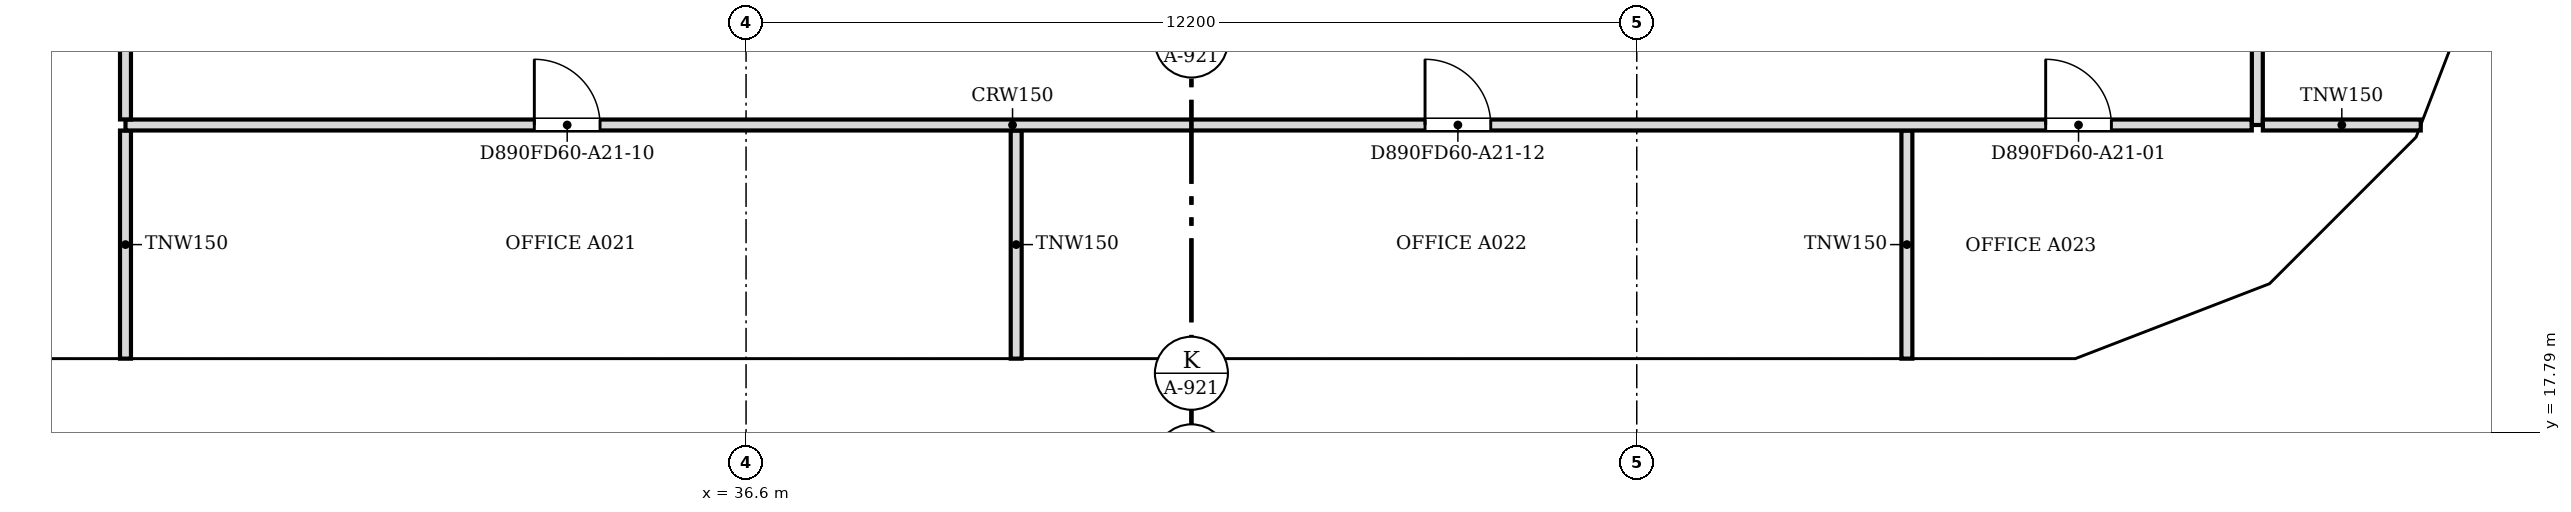
"""IFC4 building model, lengths in metres.
Left out: names, types, materials, properties, quantities, classifications, styles, units other than length and angle.
Written with IfcOpenShell. Run it as: python <this file> out.ifc"""

import sys

from ifc_helpers import new_model, si_unit, direction, frame, frame_2d, origin, place, context, subcontext, project, spatial, polyline, rectangle, outline, extrude, faceted_brep, source, transform, mapped, element, fill, save


model = new_model("IFC4")
c1 = context("Model", 3, precision=1e-05, world=origin(), true_north=direction((0.0, 1.0)))
c2 = subcontext(c1, "Body", "Model", "MODEL_VIEW")
j1 = project(units=[si_unit("LENGTHUNIT", "METRE"), si_unit("PLANEANGLEUNIT", "RADIAN")], contexts=[c1])
p1 = place(None, origin())
s1 = spatial("IfcSite", under=j1, at=p1, CompositionType="ELEMENT")
p2 = place(p1, origin())
s2 = spatial("IfcBuilding", under=s1, at=p2, CompositionType="ELEMENT")
p3 = place(p2, frame((0.0, 0.0, 240.7)))
s3 = spatial("IfcBuildingStorey", under=s2, at=p3, CompositionType="ELEMENT", Elevation=240.7)
m1 = source(origin(), c2, "Body", "SweptSolid", [
    extrude(outline(polyline([(3.05, 0.0), (6.1, 3.8), (3.05, 7.6), (0.0, 3.8), (3.05, 0.0)])), frame((0.0, 0.25, 0.0), z_axis=(0.0, -1.0, 0.0), x_axis=(1.0, 0.0, 0.0)), (0.0, 0.0, 1.0), 0.5),
])
p4 = place(p3, frame((24.4, 18.55, -3.8), z_axis=(0.0, 0.0, 1.0), x_axis=(1.0, 0.0, 0.0)))
e1 = element("IfcWall", 1, at=p4, inside=s3, PredefinedType="SOLIDWALL", context=c2, shape_type="MappedRepresentation", body=[
    mapped(m1, transform((0.0, 0.0, 0.0), scale=1.0)),
])
m2 = source(origin(), c2, "Body", "SweptSolid", [
    extrude(outline(polyline([(3.05, 0.399), (5.78, 3.8), (3.05, 7.201), (0.321, 3.8), (3.05, 0.399)])), frame((0.0, 0.26, 0.0), z_axis=(0.0, -1.0, 0.0), x_axis=(1.0, 0.0, 0.0)), (0.0, 0.0, 1.0), 0.52),
])
p5 = place(p4, origin())
e2 = element("IfcOpeningElement", 2, at=p5, cuts=e1, PredefinedType="OPENING", context=c2, shape_type="MappedRepresentation", body=[
    mapped(m2, transform((0.0, 0.0, 0.0), scale=1.0)),
])
p6 = place(p3, frame((30.5, 18.55, -3.8), z_axis=(0.0, 0.0, 1.0), x_axis=(1.0, 0.0, 0.0)))
e3 = element("IfcWall", 3, at=p6, inside=s3, PredefinedType="SOLIDWALL", context=c2, shape_type="MappedRepresentation", body=[
    mapped(m1, transform((0.0, 0.0, 0.0), scale=1.0)),
])
p7 = place(p6, origin())
e4 = element("IfcOpeningElement", 4, at=p7, cuts=e3, PredefinedType="OPENING", context=c2, shape_type="MappedRepresentation", body=[
    mapped(m2, transform((0.0, 0.0, 0.0), scale=1.0)),
])
m3 = source(origin(), c2, "Body", "Brep", [
    faceted_brep([(3.05, -0.25, 0.0), (6.1, -0.25, 3.8), (6.1, -0.25, 3.8), (3.05, -0.25, 7.6), (0.0, -0.25, 3.8), (0.0, 0.25, 3.8), (3.05, 0.25, 7.6), (6.1, 0.25, 3.8), (6.1, 0.25, 3.8), (3.05, 0.25, 0.0)], [[[0, 1, 2, 3, 4]], [[5, 6, 7, 8, 9]], [[9, 8, 1, 0]], [[7, 6, 3, 2]], [[6, 5, 4, 3]], [[5, 9, 0, 4]], [[1, 8, 7, 2]]]),
])
p8 = place(p3, frame((36.6, 18.55, -3.8), z_axis=(0.0, 0.0, 1.0), x_axis=(1.0, 0.0, 0.0)))
e5 = element("IfcWall", 5, at=p8, inside=s3, PredefinedType="SOLIDWALL", context=c2, shape_type="MappedRepresentation", body=[
    mapped(m3, transform((0.0, 0.0, 0.0), scale=1.0)),
])
p9 = place(p8, origin())
e6 = element("IfcOpeningElement", 6, at=p9, cuts=e5, PredefinedType="OPENING", context=c2, shape_type="MappedRepresentation", body=[
    mapped(m2, transform((0.0, 0.0, 0.0), scale=1.0)),
])
p10 = place(p3, frame((42.7, 18.55, -3.8), z_axis=(0.0, 0.0, 1.0), x_axis=(1.0, 0.0, 0.0)))
e7 = element("IfcWall", 7, at=p10, inside=s3, PredefinedType="SOLIDWALL", context=c2, shape_type="MappedRepresentation", body=[
    mapped(m1, transform((0.0, 0.0, 0.0), scale=1.0)),
])
p11 = place(p10, origin())
e8 = element("IfcOpeningElement", 8, at=p11, cuts=e7, PredefinedType="OPENING", context=c2, shape_type="MappedRepresentation", body=[
    mapped(m2, transform((0.0, 0.0, 0.0), scale=1.0)),
])
m4 = source(origin(), c2, "Body", "Brep", [
    faceted_brep([(3.05, -0.25, 0.0), (6.053, -0.25, 3.8), (3.05, -0.25, 7.6), (0.0, -0.25, 3.8), (0.0, 0.25, 3.8), (3.05, 0.25, 7.6), (6.007, 0.25, 3.859), (6.007, 0.25, 3.741), (3.05, 0.25, 0.0), (6.053, 0.0, 3.8)], [[[0, 1, 2, 3]], [[4, 5, 6, 7, 8]], [[8, 7, 9, 1, 0]], [[6, 5, 2, 1, 9]], [[5, 4, 3, 2]], [[4, 8, 0, 3]], [[9, 7, 6]]]),
])
p12 = place(p3, frame((48.8, 18.55, -3.8), z_axis=(0.0, 0.0, 1.0), x_axis=(1.0, 0.0, 0.0)))
e9 = element("IfcWall", 9, at=p12, inside=s3, PredefinedType="SOLIDWALL", context=c2, shape_type="MappedRepresentation", body=[
    mapped(m4, transform((0.0, 0.0, 0.0), scale=1.0)),
])
m5 = source(origin(), c2, "Body", "SweptSolid", [
    extrude(outline(polyline([(3.049, 0.401), (5.735, 3.8), (3.049, 7.199), (0.321, 3.8), (3.049, 0.401)])), frame((0.0, 0.26, 0.0), z_axis=(0.0, -1.0, 0.0), x_axis=(1.0, 0.0, 0.0)), (0.0, 0.0, 1.0), 0.52),
])
p13 = place(p12, origin())
e10 = element("IfcOpeningElement", 10, at=p13, cuts=e9, PredefinedType="OPENING", context=c2, shape_type="MappedRepresentation", body=[
    mapped(m5, transform((0.0, 0.0, 0.0), scale=1.0)),
])
m6 = source(origin(), c2, "Body", "Brep", [
    faceted_brep([(2.95, -0.25, 0.0), (3.003, -0.25, 0.068), (3.003, -0.25, 7.532), (2.95, -0.25, 7.6), (0.0, -0.25, 3.8), (0.047, 0.25, 3.86), (2.898, 0.25, 7.532), (2.898, 0.25, 0.068), (0.047, 0.25, 3.74), (2.95, 0.0, 0.0), (2.95, 0.0, 7.6), (0.0, 0.0, 3.8)], [[[0, 1, 2, 3, 4]], [[5, 6, 7, 8]], [[1, 0, 9]], [[10, 3, 2]], [[6, 5, 11, 4, 3, 10]], [[8, 7, 9, 0, 4, 11]], [[8, 11, 5]], [[1, 9, 7, 6, 10, 2]]]),
])
p14 = place(p3, frame((54.854, 18.55, -3.8), z_axis=(0.0, 0.0, 1.0), x_axis=(0.932997369089, 0.359883188373, 0.0)))
e11 = element("IfcWall", 11, at=p14, inside=s3, PredefinedType="SOLIDWALL", context=c2, shape_type="MappedRepresentation", body=[
    mapped(m6, transform((0.0, 0.0, 0.0), scale=1.0)),
])
m7 = source(origin(), c2, "Body", "SweptSolid", [
    extrude(outline(polyline([(2.75, 6.935), (0.316, 3.8), (2.75, 0.665), (2.75, 6.935)])), frame((0.0, 0.26, 0.0), z_axis=(0.0, -1.0, 0.0), x_axis=(1.0, 0.0, 0.0)), (0.0, 0.0, 1.0), 0.52),
])
p15 = place(p14, origin())
e12 = element("IfcOpeningElement", 12, at=p15, cuts=e11, PredefinedType="OPENING", context=c2, shape_type="MappedRepresentation", body=[
    mapped(m7, transform((0.0, 0.0, 0.0), scale=1.0)),
])
m8 = source(origin(), c2, "Body", "Brep", [
    faceted_brep([(0.053, -0.25, 0.0), (2.997, -0.25, 3.8), (0.053, -0.25, 7.6), (0.0, -0.25, 7.532), (0.0, -0.25, 0.068), (0.106, 0.25, 7.532), (2.944, 0.25, 3.868), (2.944, 0.25, 3.732), (0.106, 0.25, 0.068), (2.997, 0.0, 3.8), (0.053, 0.0, 0.0), (0.053, 0.0, 7.6)], [[[0, 1, 2, 3, 4]], [[5, 6, 7, 8]], [[8, 7, 9, 1, 0, 10]], [[6, 5, 11, 2, 1, 9]], [[3, 2, 11]], [[10, 0, 4]], [[8, 10, 4, 3, 11, 5]], [[9, 7, 6]]]),
])
p16 = place(p3, frame((57.569, 19.574, -3.8), z_axis=(0.0, 0.0, 1.0), x_axis=(0.707106781187, 0.707106781187, 0.0)))
e13 = element("IfcWall", 13, at=p16, inside=s3, PredefinedType="SOLIDWALL", context=c2, shape_type="MappedRepresentation", body=[
    mapped(m8, transform((0.0, 0.0, 0.0), scale=1.0)),
])
m9 = source(origin(), c2, "Body", "SweptSolid", [
    extrude(outline(polyline([(0.253, 0.667), (2.681, 3.8), (0.253, 6.934), (0.253, 0.667)])), frame((0.0, 0.26, 0.0), z_axis=(0.0, -1.0, 0.0), x_axis=(1.0, 0.0, 0.0)), (0.0, 0.0, 1.0), 0.52),
])
p17 = place(p16, origin())
e14 = element("IfcOpeningElement", 14, at=p17, cuts=e13, PredefinedType="OPENING", context=c2, shape_type="MappedRepresentation", body=[
    mapped(m9, transform((0.0, 0.0, 0.0), scale=1.0)),
])
m10 = source(origin(), c2, "Body", "Brep", [
    faceted_brep([(2.95, -0.25, 0.0), (2.997, -0.25, 0.059), (2.997, -0.25, 7.541), (2.95, -0.25, 7.6), (0.0, -0.25, 3.8), (0.053, 0.25, 3.868), (2.904, 0.25, 7.54), (2.904, 0.25, 0.06), (0.053, 0.25, 3.732), (2.95, 0.0, 0.0), (2.95, 0.0, 7.6), (0.0, 0.0, 3.8)], [[[0, 1, 2, 3, 4]], [[5, 6, 7, 8]], [[1, 0, 9]], [[10, 3, 2]], [[6, 5, 11, 4, 3, 10]], [[8, 7, 9, 0, 4, 11]], [[8, 11, 5]], [[1, 9, 7, 6, 10, 2]]]),
])
p18 = place(p3, frame((59.688, 21.694, -3.8), z_axis=(0.0, 0.0, 1.0), x_axis=(0.359972353723, 0.932962970624, 0.0)))
e15 = element("IfcWall", 15, at=p18, inside=s3, PredefinedType="SOLIDWALL", context=c2, shape_type="MappedRepresentation", body=[
    mapped(m10, transform((0.0, 0.0, 0.0), scale=1.0)),
])
p19 = place(p18, origin())
e16 = element("IfcOpeningElement", 16, at=p19, cuts=e15, PredefinedType="OPENING", context=c2, shape_type="MappedRepresentation", body=[
    mapped(m7, transform((0.0, 0.0, 0.0), scale=1.0)),
])
p20 = place(p2, frame((0.0, 0.0, 244.5)))
s4 = spatial("IfcBuildingStorey", under=s2, at=p20, CompositionType="ELEMENT", Elevation=244.5)
p21 = place(p20, frame((21.35, 18.55, -3.8), z_axis=(0.0, 0.0, 1.0), x_axis=(1.0, 0.0, 0.0)))
e17 = element("IfcWall", 17, at=p21, inside=s4, PredefinedType="SOLIDWALL", context=c2, shape_type="MappedRepresentation", body=[
    mapped(m3, transform((0.0, 0.0, 0.0), scale=1.0)),
])
p22 = place(p21, origin())
e18 = element("IfcOpeningElement", 18, at=p22, cuts=e17, PredefinedType="OPENING", context=c2, shape_type="MappedRepresentation", body=[
    mapped(m2, transform((0.0, 0.0, 0.0), scale=1.0)),
])
p23 = place(p20, frame((27.45, 18.55, -3.8), z_axis=(0.0, 0.0, 1.0), x_axis=(1.0, 0.0, 0.0)))
e19 = element("IfcWall", 19, at=p23, inside=s4, PredefinedType="SOLIDWALL", context=c2, shape_type="MappedRepresentation", body=[
    mapped(m1, transform((0.0, 0.0, 0.0), scale=1.0)),
])
p24 = place(p23, origin())
e20 = element("IfcOpeningElement", 20, at=p24, cuts=e19, PredefinedType="OPENING", context=c2, shape_type="MappedRepresentation", body=[
    mapped(m2, transform((0.0, 0.0, 0.0), scale=1.0)),
])
p25 = place(p20, frame((33.55, 18.55, -3.8), z_axis=(0.0, 0.0, 1.0), x_axis=(1.0, 0.0, 0.0)))
e21 = element("IfcWall", 21, at=p25, inside=s4, PredefinedType="SOLIDWALL", context=c2, shape_type="MappedRepresentation", body=[
    mapped(m3, transform((0.0, 0.0, 0.0), scale=1.0)),
])
p26 = place(p25, origin())
e22 = element("IfcOpeningElement", 22, at=p26, cuts=e21, PredefinedType="OPENING", context=c2, shape_type="MappedRepresentation", body=[
    mapped(m2, transform((0.0, 0.0, 0.0), scale=1.0)),
])
p27 = place(p20, frame((39.65, 18.55, -3.8), z_axis=(0.0, 0.0, 1.0), x_axis=(1.0, 0.0, 0.0)))
e23 = element("IfcWall", 23, at=p27, inside=s4, PredefinedType="SOLIDWALL", context=c2, shape_type="MappedRepresentation", body=[
    mapped(m1, transform((0.0, 0.0, 0.0), scale=1.0)),
])
p28 = place(p27, origin())
e24 = element("IfcOpeningElement", 24, at=p28, cuts=e23, PredefinedType="OPENING", context=c2, shape_type="MappedRepresentation", body=[
    mapped(m2, transform((0.0, 0.0, 0.0), scale=1.0)),
])
p29 = place(p20, frame((45.75, 18.55, -3.8), z_axis=(0.0, 0.0, 1.0), x_axis=(1.0, 0.0, 0.0)))
e25 = element("IfcWall", 25, at=p29, inside=s4, PredefinedType="SOLIDWALL", context=c2, shape_type="MappedRepresentation", body=[
    mapped(m1, transform((0.0, 0.0, 0.0), scale=1.0)),
])
p30 = place(p29, origin())
e26 = element("IfcOpeningElement", 26, at=p30, cuts=e25, PredefinedType="OPENING", context=c2, shape_type="MappedRepresentation", body=[
    mapped(m2, transform((0.0, 0.0, 0.0), scale=1.0)),
])
m11 = source(origin(), c2, "Body", "Brep", [
    faceted_brep([(3.003, -0.25, 0.0), (3.05, -0.25, 0.06), (3.05, -0.25, 7.54), (3.003, -0.25, 7.6), (0.0, -0.25, 3.8), (0.0, 0.25, 3.8), (2.957, 0.25, 7.541), (2.957, 0.25, 0.059), (3.003, 0.0, 0.0), (3.003, 0.0, 7.6)], [[[0, 1, 2, 3, 4]], [[5, 6, 7]], [[1, 0, 8]], [[9, 3, 2]], [[6, 5, 4, 3, 9]], [[5, 7, 8, 0, 4]], [[1, 8, 7, 6, 9, 2]]]),
])
p31 = place(p20, frame((51.85, 18.55, -3.8), z_axis=(0.0, 0.0, 1.0), x_axis=(1.0, 0.0, 0.0)))
e27 = element("IfcWall", 27, at=p31, inside=s4, PredefinedType="SOLIDWALL", context=c2, shape_type="MappedRepresentation", body=[
    mapped(m11, transform((0.0, 0.0, 0.0), scale=1.0)),
])
m12 = source(origin(), c2, "Body", "SweptSolid", [
    extrude(outline(polyline([(2.803, 6.944), (0.319, 3.8), (2.803, 0.656), (2.803, 6.944)])), frame((0.0, 0.26, 0.0), z_axis=(0.0, -1.0, 0.0), x_axis=(1.0, 0.0, 0.0)), (0.0, 0.0, 1.0), 0.52),
])
p32 = place(p31, origin())
e28 = element("IfcOpeningElement", 28, at=p32, cuts=e27, PredefinedType="OPENING", context=c2, shape_type="MappedRepresentation", body=[
    mapped(m12, transform((0.0, 0.0, 0.0), scale=1.0)),
])
m13 = source(origin(), c2, "Body", "Brep", [
    faceted_brep([(0.047, -0.25, 0.0), (2.997, -0.25, 3.8), (0.047, -0.25, 7.6), (0.0, -0.25, 7.541), (0.0, -0.25, 0.059), (0.093, 0.25, 7.54), (2.944, 0.25, 3.868), (2.944, 0.25, 3.732), (0.093, 0.25, 0.06), (2.997, 0.0, 3.8), (0.047, 0.0, 0.0), (0.047, 0.0, 7.6)], [[[0, 1, 2, 3, 4]], [[5, 6, 7, 8]], [[8, 7, 9, 1, 0, 10]], [[6, 5, 11, 2, 1, 9]], [[3, 2, 11]], [[10, 0, 4]], [[8, 10, 4, 3, 11, 5]], [[9, 7, 6]]]),
])
p33 = place(p20, frame((54.81, 18.533, -3.8), z_axis=(0.0, 0.0, 1.0), x_axis=(0.932990326376, 0.359901446078, 0.0)))
e29 = element("IfcWall", 29, at=p33, inside=s4, PredefinedType="SOLIDWALL", context=c2, shape_type="MappedRepresentation", body=[
    mapped(m13, transform((0.0, 0.0, 0.0), scale=1.0)),
])
m14 = source(origin(), c2, "Body", "SweptSolid", [
    extrude(outline(polyline([(0.247, 0.665), (2.681, 3.8), (0.247, 6.935), (0.247, 0.665)])), frame((0.0, 0.26, 0.0), z_axis=(0.0, -1.0, 0.0), x_axis=(1.0, 0.0, 0.0)), (0.0, 0.0, 1.0), 0.52),
])
p34 = place(p33, origin())
e30 = element("IfcOpeningElement", 30, at=p34, cuts=e29, PredefinedType="OPENING", context=c2, shape_type="MappedRepresentation", body=[
    mapped(m14, transform((0.0, 0.0, 0.0), scale=1.0)),
])
m15 = source(origin(), c2, "Body", "Brep", [
    faceted_brep([(2.944, -0.25, 0.0), (2.997, -0.25, 0.068), (2.997, -0.25, 7.532), (2.944, -0.25, 7.6), (0.0, -0.25, 3.8), (0.053, 0.25, 3.868), (2.891, 0.25, 7.532), (2.891, 0.25, 0.068), (0.053, 0.25, 3.732), (2.944, 0.0, 0.0), (2.944, 0.0, 7.6), (0.0, 0.0, 3.8)], [[[0, 1, 2, 3, 4]], [[5, 6, 7, 8]], [[1, 0, 9]], [[10, 3, 2]], [[6, 5, 11, 4, 3, 10]], [[8, 7, 9, 0, 4, 11]], [[8, 11, 5]], [[1, 9, 7, 6, 10, 2]]]),
])
p35 = place(p20, frame((57.606, 19.612, -3.8), z_axis=(0.0, 0.0, 1.0), x_axis=(0.707106781187, 0.707106781187, 0.0)))
e31 = element("IfcWall", 31, at=p35, inside=s4, PredefinedType="SOLIDWALL", context=c2, shape_type="MappedRepresentation", body=[
    mapped(m15, transform((0.0, 0.0, 0.0), scale=1.0)),
])
m16 = source(origin(), c2, "Body", "SweptSolid", [
    extrude(outline(polyline([(2.744, 6.934), (0.316, 3.8), (2.744, 0.666), (2.744, 6.934)])), frame((0.0, 0.26, 0.0), z_axis=(0.0, -1.0, 0.0), x_axis=(1.0, 0.0, 0.0)), (0.0, 0.0, 1.0), 0.52),
])
p36 = place(p35, origin())
e32 = element("IfcOpeningElement", 32, at=p36, cuts=e31, PredefinedType="OPENING", context=c2, shape_type="MappedRepresentation", body=[
    mapped(m16, transform((0.0, 0.0, 0.0), scale=1.0)),
])
m17 = source(origin(), c2, "Body", "Brep", [
    faceted_brep([(0.053, -0.25, 0.0), (3.003, -0.25, 3.8), (0.053, -0.25, 7.6), (0.0, -0.25, 7.532), (0.0, -0.25, 0.068), (0.106, 0.25, 7.532), (2.957, 0.25, 3.86), (2.957, 0.25, 3.74), (0.106, 0.25, 0.068), (3.003, 0.0, 3.8), (0.053, 0.0, 0.0), (0.053, 0.0, 7.6)], [[[0, 1, 2, 3, 4]], [[5, 6, 7, 8]], [[8, 7, 9, 1, 0, 10]], [[6, 5, 11, 2, 1, 9]], [[3, 2, 11]], [[10, 0, 4]], [[8, 10, 4, 3, 11, 5]], [[9, 7, 6]]]),
])
p37 = place(p20, frame((59.669, 21.644, -3.8), z_axis=(0.0, 0.0, 1.0), x_axis=(0.35992665181, 0.932980602862, 0.0)))
e33 = element("IfcWall", 33, at=p37, inside=s4, PredefinedType="SOLIDWALL", context=c2, shape_type="MappedRepresentation", body=[
    mapped(m17, transform((0.0, 0.0, 0.0), scale=1.0)),
])
m18 = source(origin(), c2, "Body", "SweptSolid", [
    extrude(outline(polyline([(0.253, 0.665), (2.687, 3.8), (0.253, 6.935), (0.253, 0.665)])), frame((0.0, 0.26, 0.0), z_axis=(0.0, -1.0, 0.0), x_axis=(1.0, 0.0, 0.0)), (0.0, 0.0, 1.0), 0.52),
])
p38 = place(p37, origin())
e34 = element("IfcOpeningElement", 34, at=p38, cuts=e33, PredefinedType="OPENING", context=c2, shape_type="MappedRepresentation", body=[
    mapped(m18, transform((0.0, 0.0, 0.0), scale=1.0)),
])
for number, where, z_axis, x_axis in (
    (35, (28.1, 18.8, 0.0), (0.0, 0.0, 1.0), (0.0, 1.0, 0.0)),
    (36, (40.3, 18.8, 0.0), (0.0, 0.0, 1.0), (0.0, 1.0, 0.0)),
    (37, (52.5, 18.8, 0.0), (0.0, 0.0, 1.0), (0.0, 1.0, 0.0)),
):
    element("IfcWall", number, at=place(p3, frame(where, z_axis=z_axis, x_axis=x_axis)), inside=s3, PredefinedType="PARTITIONING", context=c2, shape_type="SweptSolid", body=[
        extrude(rectangle(XDim=3.124, YDim=0.15, at=frame_2d((1.562, 0.0))), origin(), (0.0, 0.0, 1.0), 3.067),
    ])
p39 = place(p3, frame((57.224, 22.0, 0.0), z_axis=(0.0, 0.0, 1.0), x_axis=(-1.0, 0.0, 0.0)))
e38 = element("IfcWall", 38, at=p39, inside=s3, PredefinedType="PARTITIONING", context=c2, shape_type="SweptSolid", body=[
    extrude(rectangle(XDim=29.124, YDim=0.15, at=frame_2d((14.562, 0.0))), origin(), (0.0, 0.0, 1.0), 3.067),
])
m19 = source(origin(), c2, "Body", "SweptSolid", [
    extrude(rectangle(XDim=0.9, YDim=2.1, at=frame_2d((0.45, 1.05))), frame((0.0, 0.085, 0.0), z_axis=(0.0, -1.0, 0.0), x_axis=(1.0, 0.0, 0.0)), (0.0, 0.0, 1.0), 0.17),
])
p40 = place(p39, frame((1.923, 0.0, 0.0)))
e39 = element("IfcOpeningElement", 39, at=p40, cuts=e38, PredefinedType="OPENING", context=c2, shape_type="MappedRepresentation", body=[
    mapped(m19, transform((0.0, 0.0, 0.0), scale=1.0)),
])
p41 = place(p39, frame((22.624, 0.0, 0.0)))
e40 = element("IfcOpeningElement", 40, at=p41, cuts=e38, PredefinedType="OPENING", context=c2, shape_type="MappedRepresentation", body=[
    mapped(m19, transform((0.0, 0.0, 0.0), scale=1.0)),
])
p42 = place(p39, frame((10.424, 0.0, 0.0)))
e41 = element("IfcOpeningElement", 41, at=p42, cuts=e38, PredefinedType="OPENING", context=c2, shape_type="MappedRepresentation", body=[
    mapped(m19, transform((0.0, 0.0, 0.0), scale=1.0)),
])
p43 = place(p3, frame((57.3, 30.6, 0.0), z_axis=(0.0, 0.0, 1.0), x_axis=(0.0, -1.0, 0.0)))
e42 = element("IfcWall", 42, at=p43, inside=s3, PredefinedType="PARTITIONING", context=c2, shape_type="SweptSolid", body=[
    extrude(rectangle(XDim=8.6, YDim=0.15, at=frame_2d((4.3, 0.0))), origin(), (0.0, 0.0, 1.0), 3.067),
])
p44 = place(p43, frame((3.9, 0.0, 0.0)))
e43 = element("IfcOpeningElement", 43, at=p44, cuts=e42, PredefinedType="OPENING", context=c2, shape_type="MappedRepresentation", body=[
    mapped(m19, transform((0.0, 0.0, 0.0), scale=1.0)),
])
p45 = place(p3, frame((57.376, 22.0, 0.0), z_axis=(0.0, 0.0, 1.0), x_axis=(1.0, 0.0, 0.0)))
e44 = element("IfcWall", 44, at=p45, inside=s3, PredefinedType="PARTITIONING", context=c2, shape_type="SweptSolid", body=[
    extrude(rectangle(XDim=2.162, YDim=0.15, at=frame_2d((1.081, 0.0))), origin(), (0.0, 0.0, 1.0), 3.067),
])
p46 = place(p3, frame((28.1, 22.076, 0.0), z_axis=(0.0, 0.0, 1.0), x_axis=(0.0, 1.0, 0.0)))
e45 = element("IfcWall", 45, at=p46, inside=s3, PredefinedType="PARTITIONING", context=c2, shape_type="SweptSolid", body=[
    extrude(rectangle(XDim=22.748, YDim=0.15, at=frame_2d((11.374, 0.0))), origin(), (0.0, 0.0, 1.0), 3.067),
])
p47 = place(p46, frame((2.6, 0.0, 0.0)))
e46 = element("IfcOpeningElement", 46, at=p47, cuts=e45, PredefinedType="OPENING", context=c2, shape_type="MappedRepresentation", body=[
    mapped(m19, transform((0.0, 0.0, 0.0), scale=1.0)),
])
p48 = place(p46, frame((8.625, 0.0, 0.0)))
e47 = element("IfcOpeningElement", 47, at=p48, cuts=e45, PredefinedType="OPENING", context=c2, shape_type="MappedRepresentation", body=[
    mapped(m19, transform((0.0, 0.0, 0.0), scale=1.0)),
])
p49 = place(p46, frame((17.024, 0.0, 0.0)))
e48 = element("IfcOpeningElement", 48, at=p49, cuts=e45, PredefinedType="OPENING", context=c2, shape_type="MappedRepresentation", body=[
    mapped(m19, transform((0.0, 0.0, 0.0), scale=1.0)),
])
m20 = source(origin(), c2, "Body", "SweptSolid", [
    extrude(rectangle(XDim=0.9, YDim=2.1, at=frame_2d((0.45, 1.05))), frame((0.0, 0.025, 0.0), z_axis=(0.0, -1.0, 0.0), x_axis=(1.0, 0.0, 0.0)), (0.0, 0.0, 1.0), 0.05),
])
p50 = place(p40, origin())
e49 = element("IfcDoor", 49, at=p50, inside=s3, OperationType="SINGLE_SWING_RIGHT", PredefinedType="DOOR", context=c2, shape_type="MappedRepresentation", body=[
    mapped(m20, transform((0.0, 0.0, 0.0), scale=1.0)),
])
fill(e39, e49)
p51 = place(p41, origin())
e50 = element("IfcDoor", 50, at=p51, inside=s3, OperationType="SINGLE_SWING_RIGHT", PredefinedType="DOOR", context=c2, shape_type="MappedRepresentation", body=[
    mapped(m20, transform((0.0, 0.0, 0.0), scale=1.0)),
])
fill(e40, e50)
p52 = place(p42, origin())
e51 = element("IfcDoor", 51, at=p52, inside=s3, OperationType="SINGLE_SWING_RIGHT", PredefinedType="DOOR", context=c2, shape_type="MappedRepresentation", body=[
    mapped(m20, transform((0.0, 0.0, 0.0), scale=1.0)),
])
fill(e41, e51)
save(model, sys.argv[1])
